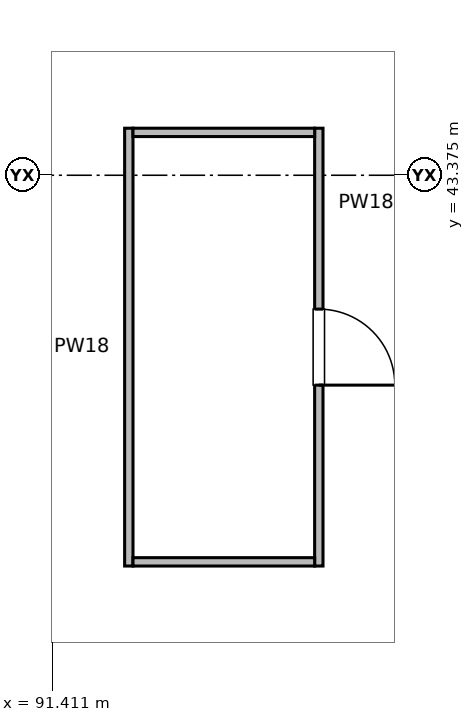
"""IFC4 building model, lengths in metres.
Left out: names, types, materials, properties, quantities, classifications, styles, units other than length and angle.
Written with IfcOpenShell. Run it as: python <this file> out.ifc"""

import sys

from ifc_helpers import new_model, si_unit, direction, frame, frame_2d, origin, place, context, subcontext, project, spatial, rectangle, extrude, element, fill, save


model = new_model("IFC4")
c1 = context("Model", 3, precision=1e-05, world=origin(), true_north=direction((0.0, 1.0)))
c2 = subcontext(c1, "Body", "Model", "MODEL_VIEW")
j1 = project(units=[si_unit("LENGTHUNIT", "METRE"), si_unit("PLANEANGLEUNIT", "RADIAN")], contexts=[c1])
p1 = place(None, origin())
s1 = spatial("IfcSite", under=j1, at=p1, CompositionType="ELEMENT")
p2 = place(p1, origin())
s2 = spatial("IfcBuilding", under=s1, at=p2, CompositionType="ELEMENT")
p3 = place(p2, origin())
s3 = spatial("IfcBuildingStorey", under=s2, at=p3, CompositionType="ELEMENT", Elevation=0.0)
p4 = place(p3, frame((94.917, 43.994, 0.0), z_axis=(0.0, 0.0, 1.0), x_axis=(0.0, -1.0, 0.0)))
e1 = element("IfcWall", 1, at=p4, inside=s3, PredefinedType="PARTITIONING", context=c2, shape_type="SweptSolid", body=[
    extrude(rectangle(XDim=5.76, YDim=0.11, at=frame_2d((2.88, 0.0))), origin(), (0.0, 0.0, 1.0), 4.625),
])
p5 = place(p4, frame((2.38, 0.0, 0.0)))
e2 = element("IfcOpeningElement", 2, at=p5, cuts=e1, PredefinedType="OPENING", context=c2, shape_type="SweptSolid", body=[
    extrude(rectangle(XDim=1.0, YDim=2.15, at=frame_2d((0.5, 1.075))), frame((0.0, 0.065, 0.0), z_axis=(0.0, -1.0, 0.0), x_axis=(1.0, 0.0, 0.0)), (0.0, 0.0, 1.0), 0.13),
])
p6 = place(p3, frame((92.417, 38.234, 0.0), z_axis=(0.0, 0.0, 1.0), x_axis=(0.0, 1.0, 0.0)))
e3 = element("IfcWall", 3, at=p6, inside=s3, PredefinedType="PARTITIONING", context=c2, shape_type="SweptSolid", body=[
    extrude(rectangle(XDim=5.76, YDim=0.11, at=frame_2d((2.88, 0.0))), origin(), (0.0, 0.0, 1.0), 4.625),
])
for number, where, z_axis, x_axis in (
    (4, (92.472, 38.289, 0.0), (0.0, 0.0, 1.0), (1.0, 0.0, 0.0)),
    (5, (92.472, 43.939, 0.0), (0.0, 0.0, 1.0), (1.0, 0.0, 0.0)),
):
    element("IfcWall", number, at=place(p3, frame(where, z_axis=z_axis, x_axis=x_axis)), inside=s3, PredefinedType="PARTITIONING", context=c2, shape_type="SweptSolid", body=[
        extrude(rectangle(XDim=2.39, YDim=0.11, at=frame_2d((1.195, 0.0))), origin(), (0.0, 0.0, 1.0), 5.02),
    ])
p7 = place(p5, origin())
e6 = element("IfcDoor", 6, at=p7, inside=s3, OperationType="SINGLE_SWING_RIGHT", PredefinedType="DOOR", context=c2, shape_type="SweptSolid", body=[
    extrude(rectangle(XDim=1.0, YDim=2.15, at=frame_2d((0.5, 1.075))), frame((0.0, 0.025, 0.0), z_axis=(0.0, -1.0, 0.0), x_axis=(1.0, 0.0, 0.0)), (0.0, 0.0, 1.0), 0.05),
])
fill(e2, e6)
save(model, sys.argv[1])
